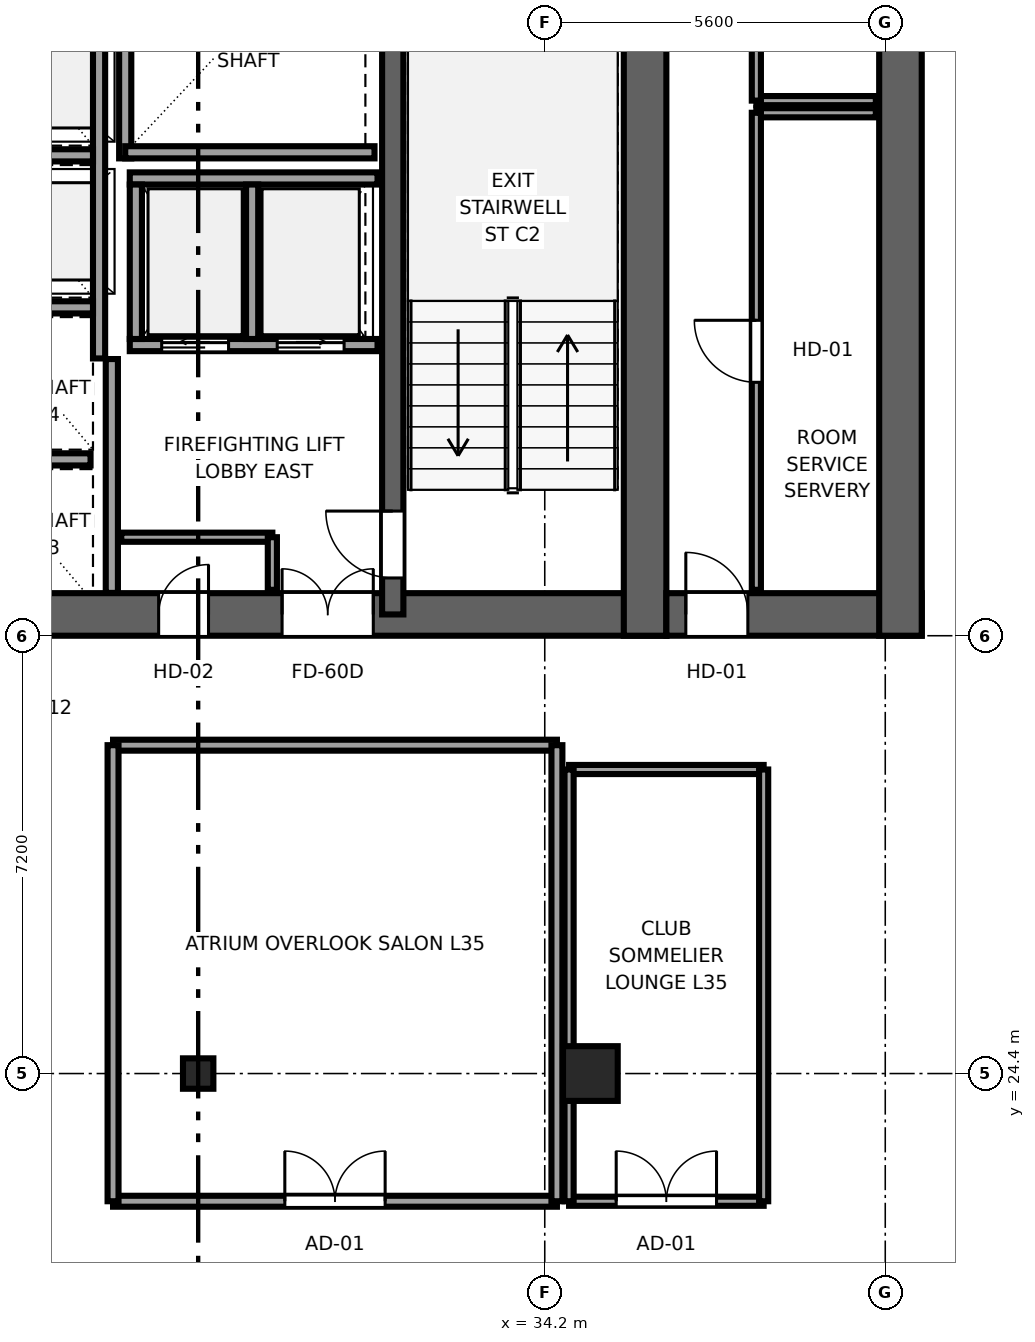
"""IFC4 building model, lengths in metres.
Left out: names, types, materials, properties, quantities, classifications, styles, units other than length and angle.
Written with IfcOpenShell. Run it as: python <this file> out.ifc"""

import sys

from ifc_helpers import new_model, si_unit, direction, frame, frame_2d, origin, origin_2d, place, context, subcontext, project, spatial, rectangle, i_section, extrude, source, transform, mapped, element, fill, save


model = new_model("IFC4")
c1 = context("Model", 3, precision=1e-05, world=origin(), true_north=direction((0.0, 1.0)))
c2 = subcontext(c1, "Body", "Model", "MODEL_VIEW")
j1 = project(units=[si_unit("LENGTHUNIT", "METRE"), si_unit("PLANEANGLEUNIT", "RADIAN")], contexts=[c1])
p1 = place(None, origin())
s1 = spatial("IfcSite", under=j1, at=p1, CompositionType="ELEMENT")
p2 = place(p1, origin())
s2 = spatial("IfcBuilding", under=s1, at=p2, CompositionType="ELEMENT")
p3 = place(p2, frame((0.0, 0.0, 136.4)))
s3 = spatial("IfcBuildingStorey", under=s2, at=p3, CompositionType="ELEMENT", Elevation=136.4)
p4 = place(p3, frame((9.8, 31.95, 0.0), z_axis=(0.0, 0.0, 1.0), x_axis=(1.0, 0.0, 0.0)))
e1 = element("IfcWall", 1, at=p4, inside=s3, PredefinedType="SHEAR", context=c2, shape_type="SweptSolid", body=[
    extrude(rectangle(XDim=26.4, YDim=0.7, at=frame_2d((13.2, 0.0))), origin(), (0.0, 0.0, 1.0), 3.55),
])
p5 = place(p4, frame((6.32, 0.0, 0.0), z_axis=(0.0, 0.0, 1.0), x_axis=(-1.0, 0.0, 0.0)))
e2 = element("IfcOpeningElement", 2, at=p5, cuts=e1, PredefinedType="OPENING", context=c2, shape_type="SweptSolid", body=[
    extrude(rectangle(XDim=1.5, YDim=2.04, at=frame_2d((0.75, 1.02))), frame((0.0, 0.36, 0.0), z_axis=(0.0, -1.0, 0.0), x_axis=(1.0, 0.0, 0.0)), (0.0, 0.0, 1.0), 0.72),
])
p6 = place(p4, frame((13.95, 0.0, 0.0), z_axis=(0.0, 0.0, 1.0), x_axis=(-1.0, 0.0, 0.0)))
e3 = element("IfcOpeningElement", 3, at=p6, cuts=e1, PredefinedType="OPENING", context=c2, shape_type="SweptSolid", body=[
    extrude(rectangle(XDim=1.5, YDim=2.04, at=frame_2d((0.75, 1.02))), frame((0.0, 0.36, 0.0), z_axis=(0.0, -1.0, 0.0), x_axis=(1.0, 0.0, 0.0)), (0.0, 0.0, 1.0), 0.72),
])
p7 = place(p4, frame((21.58, 0.0, 0.0), z_axis=(0.0, 0.0, 1.0), x_axis=(-1.0, 0.0, 0.0)))
e4 = element("IfcOpeningElement", 4, at=p7, cuts=e1, PredefinedType="OPENING", context=c2, shape_type="SweptSolid", body=[
    extrude(rectangle(XDim=1.5, YDim=2.04, at=frame_2d((0.75, 1.02))), frame((0.0, 0.36, 0.0), z_axis=(0.0, -1.0, 0.0), x_axis=(1.0, 0.0, 0.0)), (0.0, 0.0, 1.0), 0.72),
])
p8 = place(p4, frame((8.37, 0.0, 0.0), z_axis=(0.0, 0.0, 1.0), x_axis=(-1.0, 0.0, 0.0)))
e5 = element("IfcOpeningElement", 5, at=p8, cuts=e1, PredefinedType="OPENING", context=c2, shape_type="SweptSolid", body=[
    extrude(rectangle(XDim=0.82, YDim=2.01, at=frame_2d((0.41, 1.005))), frame((0.0, 0.36, 0.0), z_axis=(0.0, -1.0, 0.0), x_axis=(1.0, 0.0, 0.0)), (0.0, 0.0, 1.0), 0.72),
])
p9 = place(p4, frame((18.87, 0.0, 0.0), z_axis=(0.0, 0.0, 1.0), x_axis=(-1.0, 0.0, 0.0)))
e6 = element("IfcOpeningElement", 6, at=p9, cuts=e1, PredefinedType="OPENING", context=c2, shape_type="SweptSolid", body=[
    extrude(rectangle(XDim=0.82, YDim=2.01, at=frame_2d((0.41, 1.005))), frame((0.0, 0.36, 0.0), z_axis=(0.0, -1.0, 0.0), x_axis=(1.0, 0.0, 0.0)), (0.0, 0.0, 1.0), 0.72),
])
p10 = place(p3, frame((35.85, 31.6, 0.0), z_axis=(0.0, 0.0, 1.0), x_axis=(0.0, 1.0, 0.0)))
e7 = element("IfcWall", 7, at=p10, inside=s3, PredefinedType="SHEAR", context=c2, shape_type="SweptSolid", body=[
    extrude(rectangle(XDim=13.6, YDim=0.7, at=frame_2d((6.8, 0.0))), origin(), (0.0, 0.0, 1.0), 3.55),
])
p11 = place(p3, frame((31.7, 31.95, 0.0), z_axis=(0.0, 0.0, 1.0), x_axis=(0.0, 1.0, 0.0)))
e8 = element("IfcWall", 8, at=p11, inside=s3, PredefinedType="SHEAR", context=c2, shape_type="SweptSolid", body=[
    extrude(rectangle(XDim=12.9, YDim=0.35, at=frame_2d((6.45, 0.0))), origin(), (0.0, 0.0, 1.0), 3.55),
])
p12 = place(p11, frame((1.7, 0.0, 0.0), z_axis=(0.0, 0.0, 1.0), x_axis=(-1.0, 0.0, 0.0)))
e9 = element("IfcOpeningElement", 9, at=p12, cuts=e8, PredefinedType="OPENING", context=c2, shape_type="SweptSolid", body=[
    extrude(rectangle(XDim=1.1, YDim=2.12, at=frame_2d((0.55, 1.06))), frame((0.0, 0.185, 0.0), z_axis=(0.0, -1.0, 0.0), x_axis=(1.0, 0.0, 0.0)), (0.0, 0.0, 1.0), 0.37),
])
p13 = place(p3, frame((36.2, 31.95, 0.0), z_axis=(0.0, 0.0, 1.0), x_axis=(1.0, 0.0, 0.0)))
e10 = element("IfcWall", 10, at=p13, inside=s3, PredefinedType="SHEAR", context=c2, shape_type="SweptSolid", body=[
    extrude(rectangle(XDim=4.2, YDim=0.7, at=frame_2d((2.1, 0.0))), origin(), (0.0, 0.0, 1.0), 3.55),
])
p14 = place(p13, frame((1.34, 0.0, 0.0), z_axis=(0.0, 0.0, 1.0), x_axis=(-1.0, 0.0, 0.0)))
e11 = element("IfcOpeningElement", 11, at=p14, cuts=e10, PredefinedType="OPENING", context=c2, shape_type="SweptSolid", body=[
    extrude(rectangle(XDim=1.02, YDim=2.03, at=frame_2d((0.51, 1.015))), frame((0.0, 0.36, 0.0), z_axis=(0.0, -1.0, 0.0), x_axis=(1.0, 0.0, 0.0)), (0.0, 0.0, 1.0), 0.72),
])
p15 = place(p3, frame((40.05, 31.6, 0.0), z_axis=(0.0, 0.0, 1.0), x_axis=(0.0, 1.0, 0.0)))
e12 = element("IfcWall", 12, at=p15, inside=s3, PredefinedType="SHEAR", context=c2, shape_type="SweptSolid", body=[
    extrude(rectangle(XDim=13.6, YDim=0.7, at=frame_2d((6.8, 0.0))), origin(), (0.0, 0.0, 1.0), 3.55),
])
m1 = source(origin(), c2, "Body", "SweptSolid", [
    extrude(rectangle(XDim=0.9, YDim=0.9, at=origin_2d()), origin(), (0.0, 0.0, 1.0), 3.55),
])
p16 = place(p3, frame((34.95, 24.4, 0.0), z_axis=(0.0, 0.0, 1.0), x_axis=(1.0, 0.0, 0.0)))
e13 = element("IfcColumn", 13, at=p16, inside=s3, PredefinedType="COLUMN", context=c2, shape_type="MappedRepresentation", body=[
    mapped(m1, transform((0.0, 0.0, 0.0), x_axis=(1.0, 0.0, 0.0), y_axis=(0.0, 1.0, 0.0), z_axis=(0.0, 0.0, 1.0), scale=1.0)),
])
m2 = source(origin(), c2, "Body", "SweptSolid", [
    extrude(i_section(OverallWidth=0.5, OverallDepth=0.5, WebThickness=0.022, FlangeThickness=0.034, at=origin_2d()), origin(), (0.0, 0.0, 1.0), 3.55),
])
p17 = place(p3, frame((28.5, 24.4, 0.0), z_axis=(0.0, 0.0, 1.0), x_axis=(1.0, 0.0, 0.0)))
e14 = element("IfcColumn", 14, at=p17, inside=s3, PredefinedType="COLUMN", context=c2, shape_type="MappedRepresentation", body=[
    mapped(m2, transform((0.0, 0.0, 0.0), x_axis=(1.0, 0.0, 0.0), y_axis=(0.0, 1.0, 0.0), z_axis=(0.0, 0.0, 1.0), scale=1.0)),
])
p18 = place(p3, frame((27.3, 39.45, 0.0), z_axis=(0.0, 0.0, 1.0), x_axis=(0.0, 1.0, 0.0)))
e15 = element("IfcWall", 15, at=p18, inside=s3, PredefinedType="SOLIDWALL", context=c2, shape_type="SweptSolid", body=[
    extrude(rectangle(XDim=4.4, YDim=0.2, at=frame_2d((2.2, 0.0))), origin(), (0.0, 0.0, 1.0), 3.37),
])
p19 = place(p3, frame((27.3, 39.55, 0.0), z_axis=(0.0, 0.0, 1.0), x_axis=(1.0, 0.0, 0.0)))
e16 = element("IfcWall", 16, at=p19, inside=s3, PredefinedType="SOLIDWALL", context=c2, shape_type="SweptSolid", body=[
    extrude(rectangle(XDim=4.1, YDim=0.2, at=frame_2d((2.05, 0.0))), origin(), (0.0, 0.0, 1.0), 3.37),
])
p20 = place(p3, frame((27.08, 32.304, 0.0), z_axis=(0.0, 0.0, 1.0), x_axis=(0.0, 1.0, 0.0)))
e17 = element("IfcWall", 17, at=p20, inside=s3, PredefinedType="SOLIDWALL", context=c2, shape_type="SweptSolid", body=[
    extrude(rectangle(XDim=3.846, YDim=0.2, at=frame_2d((1.923, 0.0))), origin(), (0.0, 0.0, 1.0), 3.37),
])
p21 = place(p3, frame((27.375, 36.38, 0.0), z_axis=(0.0, 0.0, 1.0), x_axis=(1.0, 0.0, 0.0)))
e18 = element("IfcWall", 18, at=p21, inside=s3, PredefinedType="SOLIDWALL", context=c2, shape_type="SweptSolid", body=[
    extrude(rectangle(XDim=4.075, YDim=0.2, at=frame_2d((2.038, 0.0))), origin(), (0.0, 0.0, 1.0), 3.37),
])
p22 = place(p21, frame((0.525, 0.0, 0.0)))
e19 = element("IfcOpeningElement", 19, at=p22, cuts=e18, PredefinedType="OPENING", context=c2, shape_type="SweptSolid", body=[
    extrude(rectangle(XDim=1.1, YDim=2.12, at=frame_2d((0.55, 1.06))), frame((0.0, 0.11, 0.0), z_axis=(0.0, -1.0, 0.0), x_axis=(1.0, 0.0, 0.0)), (0.0, 0.0, 1.0), 0.22),
])
p23 = place(p21, frame((2.425, 0.0, 0.0)))
e20 = element("IfcOpeningElement", 20, at=p23, cuts=e18, PredefinedType="OPENING", context=c2, shape_type="SweptSolid", body=[
    extrude(rectangle(XDim=1.1, YDim=2.12, at=frame_2d((0.55, 1.06))), frame((0.0, 0.11, 0.0), z_axis=(0.0, -1.0, 0.0), x_axis=(1.0, 0.0, 0.0)), (0.0, 0.0, 1.0), 0.22),
])
p24 = place(p3, frame((27.375, 39.12, 0.0), z_axis=(0.0, 0.0, 1.0), x_axis=(1.0, 0.0, 0.0)))
e21 = element("IfcWall", 21, at=p24, inside=s3, PredefinedType="SOLIDWALL", context=c2, shape_type="SweptSolid", body=[
    extrude(rectangle(XDim=4.075, YDim=0.2, at=frame_2d((2.038, 0.0))), origin(), (0.0, 0.0, 1.0), 3.37),
])
for number, where, z_axis, x_axis in (
    (22, (27.475, 36.48, 0.0), (0.0, 0.0, 1.0), (0.0, 1.0, 0.0)),
    (23, (29.387, 36.48, 0.0), (0.0, 0.0, 1.0), (0.0, 1.0, 0.0)),
):
    element("IfcWall", number, at=place(p3, frame(where, z_axis=z_axis, x_axis=x_axis)), inside=s3, PredefinedType="SOLIDWALL", context=c2, shape_type="SweptSolid", body=[
        extrude(rectangle(XDim=2.54, YDim=0.2, at=frame_2d((1.27, 0.0))), origin(), (0.0, 0.0, 1.0), 3.37),
    ])
p25 = place(p3, frame((26.87, 36.16, 0.0), z_axis=(0.0, 0.0, 1.0), x_axis=(0.0, 1.0, 0.0)))
e24 = element("IfcWall", 24, at=p25, inside=s3, PredefinedType="SOLIDWALL", context=c2, shape_type="SweptSolid", body=[
    extrude(rectangle(XDim=8.336, YDim=0.2, at=frame_2d((4.168, 0.0))), origin(), (0.0, 0.0, 1.0), 3.37),
])
p26 = place(p3, frame((24.93, 34.5, 0.0), z_axis=(0.0, 0.0, 1.0), x_axis=(1.0, 0.0, 0.0)))
e25 = element("IfcWall", 25, at=p26, inside=s3, PredefinedType="SOLIDWALL", context=c2, shape_type="SweptSolid", body=[
    extrude(rectangle(XDim=1.8, YDim=0.2, at=frame_2d((0.9, 0.0))), origin(), (0.0, 0.0, 1.0), 3.37),
])
for number, where, z_axis, x_axis in (
    (26, (24.93, 37.0, 0.0), (0.0, 0.0, 1.0), (1.0, 0.0, 0.0)),
    (27, (24.93, 39.5, 0.0), (0.0, 0.0, 1.0), (1.0, 0.0, 0.0)),
):
    element("IfcWall", number, at=place(p3, frame(where, z_axis=z_axis, x_axis=x_axis)), inside=s3, PredefinedType="SOLIDWALL", context=c2, shape_type="SweptSolid", body=[
        extrude(rectangle(XDim=1.84, YDim=0.2, at=frame_2d((0.92, 0.0))), origin(), (0.0, 0.0, 1.0), 3.37),
    ])
p27 = place(p3, frame((27.235, 33.22, 0.0), z_axis=(0.0, 0.0, 1.0), x_axis=(1.0, 0.0, 0.0)))
e28 = element("IfcWall", 28, at=p27, inside=s3, PredefinedType="PARTITIONING", context=c2, shape_type="SweptSolid", body=[
    extrude(rectangle(XDim=2.485, YDim=0.15, at=frame_2d((1.242, 0.0))), origin(), (0.0, 0.0, 1.0), 3.37),
])
p28 = place(p3, frame((29.72, 32.355, 0.0), z_axis=(0.0, 0.0, 1.0), x_axis=(0.0, 1.0, 0.0)))
e29 = element("IfcWall", 29, at=p28, inside=s3, PredefinedType="PARTITIONING", context=c2, shape_type="SweptSolid", body=[
    extrude(rectangle(XDim=0.865, YDim=0.15, at=frame_2d((0.433, 0.0))), origin(), (0.0, 0.0, 1.0), 3.37),
])
p29 = place(p3, frame((37.68, 40.2, 0.0), z_axis=(0.0, 0.0, 1.0), x_axis=(1.0, 0.0, 0.0)))
e30 = element("IfcWall", 30, at=p29, inside=s3, PredefinedType="PARTITIONING", context=c2, shape_type="SweptSolid", body=[
    extrude(rectangle(XDim=1.965, YDim=0.15, at=frame_2d((0.982, 0.0))), origin(), (0.0, 0.0, 1.0), 3.37),
])
p30 = place(p3, frame((37.68, 32.355, 0.0), z_axis=(0.0, 0.0, 1.0), x_axis=(0.0, 1.0, 0.0)))
e31 = element("IfcWall", 31, at=p30, inside=s3, PredefinedType="PARTITIONING", context=c2, shape_type="SweptSolid", body=[
    extrude(rectangle(XDim=7.845, YDim=0.15, at=frame_2d((3.922, 0.0))), origin(), (0.0, 0.0, 1.0), 3.37),
])
p31 = place(p30, frame((3.413, 0.0, 0.0)))
e32 = element("IfcOpeningElement", 32, at=p31, cuts=e31, PredefinedType="OPENING", context=c2, shape_type="SweptSolid", body=[
    extrude(rectangle(XDim=1.02, YDim=2.03, at=frame_2d((0.51, 1.015))), frame((0.0, 0.085, 0.0), z_axis=(0.0, -1.0, 0.0), x_axis=(1.0, 0.0, 0.0)), (0.0, 0.0, 1.0), 0.17),
])
p32 = place(p3, frame((37.68, 40.4, 0.0), z_axis=(0.0, 0.0, 1.0), x_axis=(1.0, 0.0, 0.0)))
e33 = element("IfcWall", 33, at=p32, inside=s3, PredefinedType="PARTITIONING", context=c2, shape_type="SweptSolid", body=[
    extrude(rectangle(XDim=1.965, YDim=0.15, at=frame_2d((0.982, 0.0))), origin(), (0.0, 0.0, 1.0), 3.37),
])
p33 = place(p3, frame((37.68, 40.4, 0.0), z_axis=(0.0, 0.0, 1.0), x_axis=(0.0, 1.0, 0.0)))
e34 = element("IfcWall", 34, at=p33, inside=s3, PredefinedType="PARTITIONING", context=c2, shape_type="SweptSolid", body=[
    extrude(rectangle(XDim=3.2, YDim=0.15, at=frame_2d((1.6, 0.0))), origin(), (0.0, 0.0, 1.0), 3.37),
])
p34 = place(p33, frame((1.19, 0.0, 0.0)))
e35 = element("IfcOpeningElement", 35, at=p34, cuts=e34, PredefinedType="OPENING", context=c2, shape_type="SweptSolid", body=[
    extrude(rectangle(XDim=0.82, YDim=2.01, at=frame_2d((0.41, 1.005))), frame((0.0, 0.085, 0.0), z_axis=(0.0, -1.0, 0.0), x_axis=(1.0, 0.0, 0.0)), (0.0, 0.0, 1.0), 0.17),
])
p35 = place(p3, frame((27.1, 22.3, 0.0), z_axis=(0.0, 0.0, 1.0), x_axis=(1.0, 0.0, 0.0)))
e36 = element("IfcWall", 36, at=p35, inside=s3, PredefinedType="PARTITIONING", context=c2, shape_type="SweptSolid", body=[
    extrude(rectangle(XDim=7.3, YDim=0.18, at=frame_2d((3.65, 0.0))), origin(), (0.0, 0.0, 1.0), 3.37),
])
p36 = place(p35, frame((2.825, 0.0, 0.0)))
e37 = element("IfcOpeningElement", 37, at=p36, cuts=e36, PredefinedType="OPENING", context=c2, shape_type="SweptSolid", body=[
    extrude(rectangle(XDim=1.65, YDim=2.15, at=frame_2d((0.825, 1.075))), frame((0.0, 0.1, 0.0), z_axis=(0.0, -1.0, 0.0), x_axis=(1.0, 0.0, 0.0)), (0.0, 0.0, 1.0), 0.2),
])
p37 = place(p3, frame((27.1, 29.8, 0.0), z_axis=(0.0, 0.0, 1.0), x_axis=(1.0, 0.0, 0.0)))
e38 = element("IfcWall", 38, at=p37, inside=s3, PredefinedType="PARTITIONING", context=c2, shape_type="SweptSolid", body=[
    extrude(rectangle(XDim=7.3, YDim=0.18, at=frame_2d((3.65, 0.0))), origin(), (0.0, 0.0, 1.0), 3.37),
])
for number, where, z_axis, x_axis in (
    (39, (27.1, 22.3, 0.0), (0.0, 0.0, 1.0), (0.0, 1.0, 0.0)),
    (40, (34.4, 22.3, 0.0), (0.0, 0.0, 1.0), (0.0, 1.0, 0.0)),
):
    element("IfcWall", number, at=place(p3, frame(where, z_axis=z_axis, x_axis=x_axis)), inside=s3, PredefinedType="PARTITIONING", context=c2, shape_type="SweptSolid", body=[
        extrude(rectangle(XDim=7.5, YDim=0.18, at=frame_2d((3.75, 0.0))), origin(), (0.0, 0.0, 1.0), 3.37),
    ])
p38 = place(p3, frame((34.6, 22.3, 0.0), z_axis=(0.0, 0.0, 1.0), x_axis=(1.0, 0.0, 0.0)))
e41 = element("IfcWall", 41, at=p38, inside=s3, PredefinedType="PARTITIONING", context=c2, shape_type="SweptSolid", body=[
    extrude(rectangle(XDim=3.2, YDim=0.15, at=frame_2d((1.6, 0.0))), origin(), (0.0, 0.0, 1.0), 3.37),
])
p39 = place(p38, frame((0.775, 0.0, 0.0)))
e42 = element("IfcOpeningElement", 42, at=p39, cuts=e41, PredefinedType="OPENING", context=c2, shape_type="SweptSolid", body=[
    extrude(rectangle(XDim=1.65, YDim=2.15, at=frame_2d((0.825, 1.075))), frame((0.0, 0.085, 0.0), z_axis=(0.0, -1.0, 0.0), x_axis=(1.0, 0.0, 0.0)), (0.0, 0.0, 1.0), 0.17),
])
p40 = place(p3, frame((34.6, 29.4, 0.0), z_axis=(0.0, 0.0, 1.0), x_axis=(1.0, 0.0, 0.0)))
e43 = element("IfcWall", 43, at=p40, inside=s3, PredefinedType="PARTITIONING", context=c2, shape_type="SweptSolid", body=[
    extrude(rectangle(XDim=3.2, YDim=0.15, at=frame_2d((1.6, 0.0))), origin(), (0.0, 0.0, 1.0), 3.37),
])
for number, where, z_axis, x_axis in (
    (44, (34.6, 22.3, 0.0), (0.0, 0.0, 1.0), (0.0, 1.0, 0.0)),
    (45, (37.8, 22.3, 0.0), (0.0, 0.0, 1.0), (0.0, 1.0, 0.0)),
):
    element("IfcWall", number, at=place(p3, frame(where, z_axis=z_axis, x_axis=x_axis)), inside=s3, PredefinedType="PARTITIONING", context=c2, shape_type="SweptSolid", body=[
        extrude(rectangle(XDim=7.1, YDim=0.15, at=frame_2d((3.55, 0.0))), origin(), (0.0, 0.0, 1.0), 3.37),
    ])
m3 = source(origin(), c2, "Body", "SweptSolid", [
    extrude(rectangle(XDim=1.1, YDim=2.12, at=frame_2d((0.55, 1.06))), frame((0.0, 0.025, 0.0), z_axis=(0.0, -1.0, 0.0), x_axis=(1.0, 0.0, 0.0)), (0.0, 0.0, 1.0), 0.05),
])
p41 = place(p12, origin())
e46 = element("IfcDoor", 46, at=p41, inside=s3, OperationType="SINGLE_SWING_RIGHT", PredefinedType="DOOR", context=c2, shape_type="MappedRepresentation", body=[
    mapped(m3, transform((0.0, 0.0, 0.0), x_axis=(1.0, 0.0, 0.0), y_axis=(0.0, 1.0, 0.0), z_axis=(0.0, 0.0, 1.0), scale=1.0)),
])
fill(e9, e46)
m4 = source(origin(), c2, "Body", "SweptSolid", [
    extrude(rectangle(XDim=1.5, YDim=2.04, at=frame_2d((0.75, 1.02))), frame((0.0, 0.025, 0.0), z_axis=(0.0, -1.0, 0.0), x_axis=(1.0, 0.0, 0.0)), (0.0, 0.0, 1.0), 0.05),
])
p42 = place(p7, origin())
e47 = element("IfcDoor", 47, at=p42, inside=s3, OperationType="DOUBLE_DOOR_SINGLE_SWING", PredefinedType="DOOR", context=c2, shape_type="MappedRepresentation", body=[
    mapped(m4, transform((0.0, 0.0, 0.0), x_axis=(1.0, 0.0, 0.0), y_axis=(0.0, 1.0, 0.0), z_axis=(0.0, 0.0, 1.0), scale=1.0)),
])
fill(e4, e47)
m5 = source(origin(), c2, "Body", "SweptSolid", [
    extrude(rectangle(XDim=0.82, YDim=2.01, at=frame_2d((0.41, 1.005))), frame((0.0, 0.025, 0.0), z_axis=(0.0, -1.0, 0.0), x_axis=(1.0, 0.0, 0.0)), (0.0, 0.0, 1.0), 0.05),
])
p43 = place(p9, origin())
e48 = element("IfcDoor", 48, at=p43, inside=s3, OperationType="SINGLE_SWING_RIGHT", PredefinedType="DOOR", context=c2, shape_type="MappedRepresentation", body=[
    mapped(m5, transform((0.0, 0.0, 0.0), x_axis=(1.0, 0.0, 0.0), y_axis=(0.0, 1.0, 0.0), z_axis=(0.0, 0.0, 1.0), scale=1.0)),
])
fill(e6, e48)
m6 = source(origin(), c2, "Body", "SweptSolid", [
    extrude(rectangle(XDim=1.02, YDim=2.03, at=frame_2d((0.51, 1.015))), frame((0.0, 0.025, 0.0), z_axis=(0.0, -1.0, 0.0), x_axis=(1.0, 0.0, 0.0)), (0.0, 0.0, 1.0), 0.05),
])
p44 = place(p14, origin())
e49 = element("IfcDoor", 49, at=p44, inside=s3, OperationType="SINGLE_SWING_LEFT", PredefinedType="DOOR", context=c2, shape_type="MappedRepresentation", body=[
    mapped(m6, transform((0.0, 0.0, 0.0), x_axis=(1.0, 0.0, 0.0), y_axis=(0.0, 1.0, 0.0), z_axis=(0.0, 0.0, 1.0), scale=1.0)),
])
fill(e11, e49)
m7 = source(origin(), c2, "Body", "SweptSolid", [
    extrude(rectangle(XDim=1.1, YDim=2.12, at=frame_2d((0.55, 1.06))), frame((0.0, 0.025, 0.0), z_axis=(0.0, -1.0, 0.0), x_axis=(1.0, 0.0, 0.0)), (0.0, 0.0, 1.0), 0.05),
])
p45 = place(p22, origin())
e50 = element("IfcDoor", 50, at=p45, inside=s3, OperationType="SLIDING_TO_LEFT", PredefinedType="DOOR", context=c2, shape_type="MappedRepresentation", body=[
    mapped(m7, transform((0.0, 0.0, 0.0), x_axis=(1.0, 0.0, 0.0), y_axis=(0.0, 1.0, 0.0), z_axis=(0.0, 0.0, 1.0), scale=1.0)),
])
fill(e19, e50)
p46 = place(p23, origin())
e51 = element("IfcDoor", 51, at=p46, inside=s3, OperationType="SLIDING_TO_RIGHT", PredefinedType="DOOR", context=c2, shape_type="MappedRepresentation", body=[
    mapped(m7, transform((0.0, 0.0, 0.0), x_axis=(1.0, 0.0, 0.0), y_axis=(0.0, 1.0, 0.0), z_axis=(0.0, 0.0, 1.0), scale=1.0)),
])
fill(e20, e51)
p47 = place(p31, origin())
e52 = element("IfcDoor", 52, at=p47, inside=s3, OperationType="SINGLE_SWING_RIGHT", PredefinedType="DOOR", context=c2, shape_type="MappedRepresentation", body=[
    mapped(m6, transform((0.0, 0.0, 0.0), x_axis=(1.0, 0.0, 0.0), y_axis=(0.0, 1.0, 0.0), z_axis=(0.0, 0.0, 1.0), scale=1.0)),
])
fill(e32, e52)
m8 = source(origin(), c2, "Body", "SweptSolid", [
    extrude(rectangle(XDim=1.65, YDim=2.15, at=frame_2d((0.825, 1.075))), frame((0.0, 0.025, 0.0), z_axis=(0.0, -1.0, 0.0), x_axis=(1.0, 0.0, 0.0)), (0.0, 0.0, 1.0), 0.05),
])
p48 = place(p36, origin())
e53 = element("IfcDoor", 53, at=p48, inside=s3, OperationType="DOUBLE_DOOR_SINGLE_SWING", PredefinedType="DOOR", context=c2, shape_type="MappedRepresentation", body=[
    mapped(m8, transform((0.0, 0.0, 0.0), x_axis=(1.0, 0.0, 0.0), y_axis=(0.0, 1.0, 0.0), z_axis=(0.0, 0.0, 1.0), scale=1.0)),
])
fill(e37, e53)
p49 = place(p39, origin())
e54 = element("IfcDoor", 54, at=p49, inside=s3, OperationType="DOUBLE_DOOR_SINGLE_SWING", PredefinedType="DOOR", context=c2, shape_type="MappedRepresentation", body=[
    mapped(m8, transform((0.0, 0.0, 0.0), x_axis=(1.0, 0.0, 0.0), y_axis=(0.0, 1.0, 0.0), z_axis=(0.0, 0.0, 1.0), scale=1.0)),
])
fill(e42, e54)
save(model, sys.argv[1])
